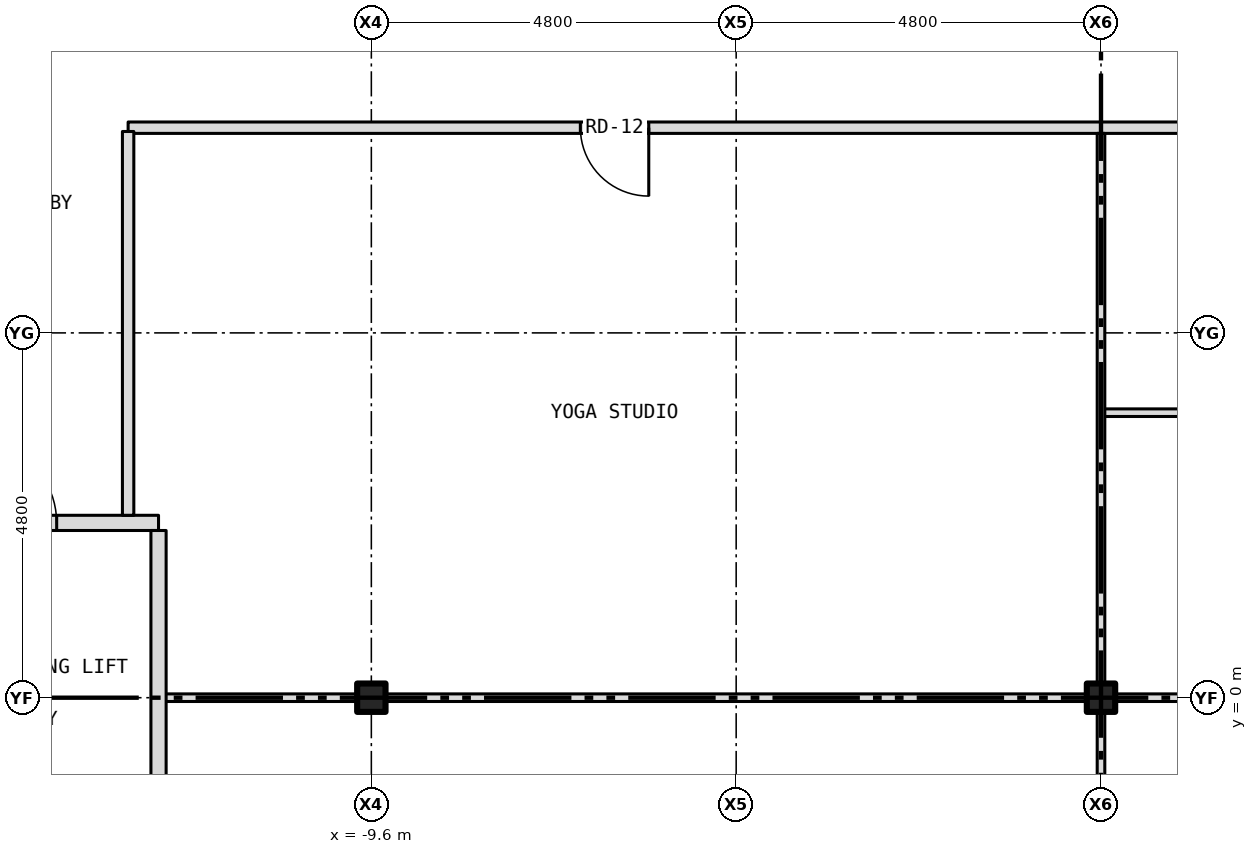
"""IFC4 building model, lengths in metres.
Left out: names, types, materials, properties, quantities, classifications, styles, units other than length and angle.
Written with IfcOpenShell. Run it as: python <this file> out.ifc"""

import sys

from ifc_helpers import new_model, si_unit, direction, frame, frame_2d, origin, origin_2d, place, context, subcontext, project, spatial, rectangle, i_section, extrude, element, fill, save


model = new_model("IFC4")
c1 = context("Model", 3, precision=1e-05, world=origin(), true_north=direction((0.0, 1.0)))
c2 = subcontext(c1, "Body", "Model", "MODEL_VIEW")
j1 = project(units=[si_unit("LENGTHUNIT", "METRE"), si_unit("PLANEANGLEUNIT", "RADIAN")], contexts=[c1])
p1 = place(None, origin())
s1 = spatial("IfcSite", under=j1, at=p1, CompositionType="ELEMENT")
p2 = place(p1, origin())
s2 = spatial("IfcBuilding", under=s1, at=p2, CompositionType="ELEMENT")
p3 = place(p2, frame((0.0, 0.0, 205.0)))
s3 = spatial("IfcBuildingStorey", under=s2, at=p3, CompositionType="ELEMENT", Elevation=205.0)
for number, where, z_axis, x_axis in (
    (1, (-9.6, 0.0, -0.15), (0.0, 0.0, 1.0), (1.0, 0.0, 0.0)),
    (2, (0.0, 0.0, -0.15), (0.0, 0.0, 1.0), (1.0, 0.0, 0.0)),
):
    element("IfcColumn", number, at=place(p3, frame(where, z_axis=z_axis, x_axis=x_axis)), inside=s3, PredefinedType="COLUMN", context=c2, shape_type="SweptSolid", body=[
        extrude(i_section(OverallWidth=0.373, OverallDepth=0.373, WebThickness=0.016, FlangeThickness=0.026, at=origin_2d()), origin(), (0.0, 0.0, 1.0), 3.5),
    ])
p4 = place(p3, frame((-12.4, 0.0, 0.0), z_axis=(0.0, 0.0, 1.0), x_axis=(1.0, 0.0, 0.0)))
e3 = element("IfcWall", 3, at=p4, inside=s3, PredefinedType="PARTITIONING", context=c2, shape_type="SweptSolid", body=[
    extrude(rectangle(XDim=2.613, YDim=0.1, at=frame_2d((1.306, 0.0))), origin(), (0.0, 0.0, 1.0), 2.728),
])
p5 = place(p3, frame((-9.787, 0.0, 0.0), z_axis=(0.0, 0.0, 1.0), x_axis=(1.0, 0.0, 0.0)))
e4 = element("IfcWall", 4, at=p5, inside=s3, PredefinedType="PARTITIONING", context=c2, shape_type="SweptSolid", body=[
    extrude(rectangle(XDim=0.374, YDim=0.1, at=frame_2d((0.187, 0.0))), origin(), (0.0, 0.0, 1.0), 3.35),
])
p6 = place(p3, frame((-9.413, 0.0, 0.0), z_axis=(0.0, 0.0, 1.0), x_axis=(1.0, 0.0, 0.0)))
e5 = element("IfcWall", 5, at=p6, inside=s3, PredefinedType="PARTITIONING", context=c2, shape_type="SweptSolid", body=[
    extrude(rectangle(XDim=9.226, YDim=0.1, at=frame_2d((4.613, 0.0))), origin(), (0.0, 0.0, 1.0), 2.728),
])
p7 = place(p3, frame((-0.187, 0.0, 0.0), z_axis=(0.0, 0.0, 1.0), x_axis=(1.0, 0.0, 0.0)))
e6 = element("IfcWall", 6, at=p7, inside=s3, PredefinedType="PARTITIONING", context=c2, shape_type="SweptSolid", body=[
    extrude(rectangle(XDim=0.374, YDim=0.1, at=frame_2d((0.187, 0.0))), origin(), (0.0, 0.0, 1.0), 3.35),
])
p8 = place(p3, frame((0.187, 0.0, 0.0), z_axis=(0.0, 0.0, 1.0), x_axis=(1.0, 0.0, 0.0)))
e7 = element("IfcWall", 7, at=p8, inside=s3, PredefinedType="PARTITIONING", context=c2, shape_type="SweptSolid", body=[
    extrude(rectangle(XDim=3.913, YDim=0.1, at=frame_2d((1.957, 0.0))), origin(), (0.0, 0.0, 1.0), 2.728),
])
p9 = place(p3, frame((-15.68, 2.3, 0.0), z_axis=(0.0, 0.0, 1.0), x_axis=(1.0, 0.0, 0.0)))
e8 = element("IfcWall", 8, at=p9, inside=s3, PredefinedType="PARTITIONING", context=c2, shape_type="SweptSolid", body=[
    extrude(rectangle(XDim=3.28, YDim=0.2, at=frame_2d((1.64, 0.0))), origin(), (0.0, 0.0, 1.0), 3.35),
])
p10 = place(p9, frame((0.84, 0.0, 0.0)))
e9 = element("IfcOpeningElement", 9, at=p10, cuts=e8, PredefinedType="OPENING", context=c2, shape_type="SweptSolid", body=[
    extrude(rectangle(XDim=1.1, YDim=2.1, at=frame_2d((0.55, 1.05))), frame((0.0, 0.112, 0.0), z_axis=(0.0, -1.0, 0.0), x_axis=(1.0, 0.0, 0.0)), (0.0, 0.0, 1.0), 0.224),
])
p11 = place(p3, frame((0.0, 3.75, 0.0), z_axis=(0.0, 0.0, 1.0), x_axis=(1.0, 0.0, 0.0)))
e10 = element("IfcWall", 10, at=p11, inside=s3, PredefinedType="PARTITIONING", context=c2, shape_type="SweptSolid", body=[
    extrude(rectangle(XDim=4.1, YDim=0.1, at=frame_2d((2.05, 0.0))), origin(), (0.0, 0.0, 1.0), 3.35),
])
p12 = place(p3, frame((-12.8, 7.5, 0.0), z_axis=(0.0, 0.0, 1.0), x_axis=(1.0, 0.0, 0.0)))
e11 = element("IfcWall", 11, at=p12, inside=s3, PredefinedType="PARTITIONING", context=c2, shape_type="SweptSolid", body=[
    extrude(rectangle(XDim=16.9, YDim=0.15, at=frame_2d((8.45, 0.0))), origin(), (0.0, 0.0, 1.0), 3.35),
])
p13 = place(p12, frame((14.4, 0.0, 0.0)))
e12 = element("IfcOpeningElement", 12, at=p13, cuts=e11, PredefinedType="OPENING", context=c2, shape_type="SweptSolid", body=[
    extrude(rectangle(XDim=0.9, YDim=2.1, at=frame_2d((0.45, 1.05))), frame((0.0, 0.087, 0.0), z_axis=(0.0, -1.0, 0.0), x_axis=(1.0, 0.0, 0.0)), (0.0, 0.0, 1.0), 0.174),
])
p14 = place(p12, frame((5.95, 0.0, 0.0)))
e13 = element("IfcOpeningElement", 13, at=p14, cuts=e11, PredefinedType="OPENING", context=c2, shape_type="SweptSolid", body=[
    extrude(rectangle(XDim=0.9, YDim=2.1, at=frame_2d((0.45, 1.05))), frame((0.0, 0.087, 0.0), z_axis=(0.0, -1.0, 0.0), x_axis=(1.0, 0.0, 0.0)), (0.0, 0.0, 1.0), 0.174),
])
p15 = place(p3, frame((-12.8, 2.4, 0.0), z_axis=(0.0, 0.0, 1.0), x_axis=(0.0, 1.0, 0.0)))
e14 = element("IfcWall", 14, at=p15, inside=s3, PredefinedType="PARTITIONING", context=c2, shape_type="SweptSolid", body=[
    extrude(rectangle(XDim=5.05, YDim=0.15, at=frame_2d((2.525, 0.0))), origin(), (0.0, 0.0, 1.0), 3.35),
])
p16 = place(p3, frame((-12.4, -1.8, 0.0), z_axis=(0.0, 0.0, 1.0), x_axis=(0.0, 1.0, 0.0)))
e15 = element("IfcWall", 15, at=p16, inside=s3, PredefinedType="PARTITIONING", context=c2, shape_type="SweptSolid", body=[
    extrude(rectangle(XDim=4.0, YDim=0.2, at=frame_2d((2.0, 0.0))), origin(), (0.0, 0.0, 1.0), 3.35),
])
p17 = place(p3, frame((0.0, -9.413, 0.0), z_axis=(0.0, 0.0, 1.0), x_axis=(0.0, 1.0, 0.0)))
e16 = element("IfcWall", 16, at=p17, inside=s3, PredefinedType="PARTITIONING", context=c2, shape_type="SweptSolid", body=[
    extrude(rectangle(XDim=9.363, YDim=0.1, at=frame_2d((4.682, 0.0))), origin(), (0.0, 0.0, 1.0), 2.728),
])
p18 = place(p3, frame((0.0, 0.05, 0.0), z_axis=(0.0, 0.0, 1.0), x_axis=(0.0, 1.0, 0.0)))
e17 = element("IfcWall", 17, at=p18, inside=s3, PredefinedType="PARTITIONING", context=c2, shape_type="SweptSolid", body=[
    extrude(rectangle(XDim=7.375, YDim=0.1, at=frame_2d((3.688, 0.0))), origin(), (0.0, 0.0, 1.0), 2.728),
])
p19 = place(p10, origin())
e18 = element("IfcDoor", 18, at=p19, inside=s3, OperationType="SINGLE_SWING_LEFT", PredefinedType="DOOR", context=c2, shape_type="SweptSolid", body=[
    extrude(rectangle(XDim=1.1, YDim=2.1, at=frame_2d((0.55, 1.05))), frame((0.0, 0.025, 0.0), z_axis=(0.0, -1.0, 0.0), x_axis=(1.0, 0.0, 0.0)), (0.0, 0.0, 1.0), 0.05),
])
fill(e9, e18)
p20 = place(p14, origin())
e19 = element("IfcDoor", 19, at=p20, inside=s3, OperationType="SINGLE_SWING_RIGHT", PredefinedType="DOOR", context=c2, shape_type="SweptSolid", body=[
    extrude(rectangle(XDim=0.9, YDim=2.1, at=frame_2d((0.45, 1.05))), frame((0.0, 0.025, 0.0), z_axis=(0.0, -1.0, 0.0), x_axis=(1.0, 0.0, 0.0)), (0.0, 0.0, 1.0), 0.05),
])
fill(e13, e19)
save(model, sys.argv[1])
